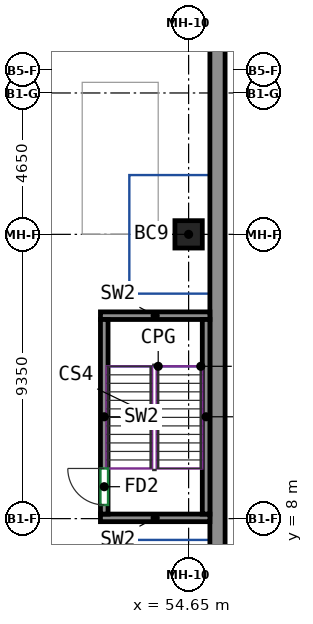
"""IFC4 building model, lengths in metres.
Left out: names, types, materials, properties, quantities, classifications, styles, units other than length and angle.
Written with IfcOpenShell. Run it as: python <this file> out.ifc"""

import sys

from ifc_helpers import new_model, si_unit, direction, frame, frame_2d, origin, origin_2d, place, context, subcontext, project, spatial, rectangle, extrude, source, transform, mapped, element, fill, save


model = new_model("IFC4")
c1 = context("Model", 3, precision=1e-05, world=origin(), true_north=direction((0.0, 1.0)))
c2 = subcontext(c1, "Body", "Model", "MODEL_VIEW")
j1 = project(units=[si_unit("LENGTHUNIT", "METRE"), si_unit("PLANEANGLEUNIT", "RADIAN")], contexts=[c1])
p1 = place(None, origin())
s1 = spatial("IfcSite", under=j1, at=p1, CompositionType="ELEMENT")
p2 = place(p1, origin())
s2 = spatial("IfcBuilding", under=s1, at=p2, CompositionType="ELEMENT")
p3 = place(p2, frame((0.0, 0.0, -9.0)))
s3 = spatial("IfcBuildingStorey", under=s2, at=p3, CompositionType="ELEMENT", Elevation=-9.0)
m1 = source(origin(), c2, "Body", "SweptSolid", [
    extrude(rectangle(XDim=0.9, YDim=0.9, at=origin_2d()), origin(), (0.0, 0.0, 1.0), 4.5),
])
p4 = place(p3, frame((54.65, 17.35, 0.0), z_axis=(0.0, 0.0, 1.0), x_axis=(1.0, 0.0, 0.0)))
e1 = element("IfcColumn", 1, at=p4, inside=s3, PredefinedType="COLUMN", context=c2, shape_type="MappedRepresentation", body=[
    mapped(m1, transform((0.0, 0.0, 0.0))),
])
m2 = source(origin(), c2, "Body", "SweptSolid", [
    extrude(rectangle(XDim=100.0, YDim=0.5, at=frame_2d((50.0, 0.0))), origin(), (0.0, 0.0, 1.0), 4.9),
])
p5 = place(p3, frame((55.6, -43.35, -0.4), z_axis=(0.0, 0.0, 1.0), x_axis=(0.0, 1.0, 0.0)))
e2 = element("IfcWall", 2, at=p5, inside=s3, PredefinedType="SOLIDWALL", context=c2, shape_type="MappedRepresentation", body=[
    mapped(m2, transform((0.0, 0.0, 0.0))),
])
m3 = source(origin(), c2, "Body", "SweptSolid", [
    extrude(rectangle(XDim=3.6, YDim=0.25, at=frame_2d((1.8, 0.0))), origin(), (0.0, 0.0, 1.0), 4.1),
])
for number, where, z_axis, x_axis in (
    (3, (51.75, 8.025, 0.0), (0.0, 0.0, 1.0), (1.0, 0.0, 0.0)),
    (4, (51.75, 14.675, 0.0), (0.0, 0.0, 1.0), (1.0, 0.0, 0.0)),
):
    element("IfcWall", number, at=place(p3, frame(where, z_axis=z_axis, x_axis=x_axis)), inside=s3, PredefinedType="SHEAR", context=c2, shape_type="MappedRepresentation", body=[
        mapped(m3, transform((0.0, 0.0, 0.0))),
    ])
m4 = source(origin(), c2, "Body", "SweptSolid", [
    extrude(rectangle(XDim=6.4, YDim=0.25, at=frame_2d((3.2, 0.0))), origin(), (0.0, 0.0, 1.0), 4.1),
])
p6 = place(p3, frame((51.875, 8.15, 0.0), z_axis=(0.0, 0.0, 1.0), x_axis=(0.0, 1.0, 0.0)))
e5 = element("IfcWall", 5, at=p6, inside=s3, PredefinedType="SHEAR", context=c2, shape_type="MappedRepresentation", body=[
    mapped(m4, transform((0.0, 0.0, 0.0))),
])
p7 = place(p6, frame((0.3, 0.0, 0.0)))
e6 = element("IfcOpeningElement", 6, at=p7, cuts=e5, PredefinedType="OPENING", context=c2, shape_type="SweptSolid", body=[
    extrude(rectangle(XDim=1.2, YDim=2.1, at=frame_2d((0.6, 1.05))), frame((0.0, 0.135, 0.0), z_axis=(0.0, -1.0, 0.0), x_axis=(1.0, 0.0, 0.0)), (0.0, 0.0, 1.0), 0.27),
])
p8 = place(p3, frame((55.225, 8.15, 0.0), z_axis=(0.0, 0.0, 1.0), x_axis=(0.0, 1.0, 0.0)))
e7 = element("IfcWall", 7, at=p8, inside=s3, PredefinedType="SHEAR", context=c2, shape_type="MappedRepresentation", body=[
    mapped(m4, transform((0.0, 0.0, 0.0))),
])
p9 = place(p7, origin())
e8 = element("IfcDoor", 8, at=p9, inside=s3, OperationType="SINGLE_SWING_RIGHT", PredefinedType="DOOR", context=c2, shape_type="SweptSolid", body=[
    extrude(rectangle(XDim=1.2, YDim=2.1, at=frame_2d((0.6, 1.05))), frame((0.0, 0.025, 0.0), z_axis=(0.0, -1.0, 0.0), x_axis=(1.0, 0.0, 0.0)), (0.0, 0.0, 1.0), 0.05),
])
fill(e6, e8)
save(model, sys.argv[1])
